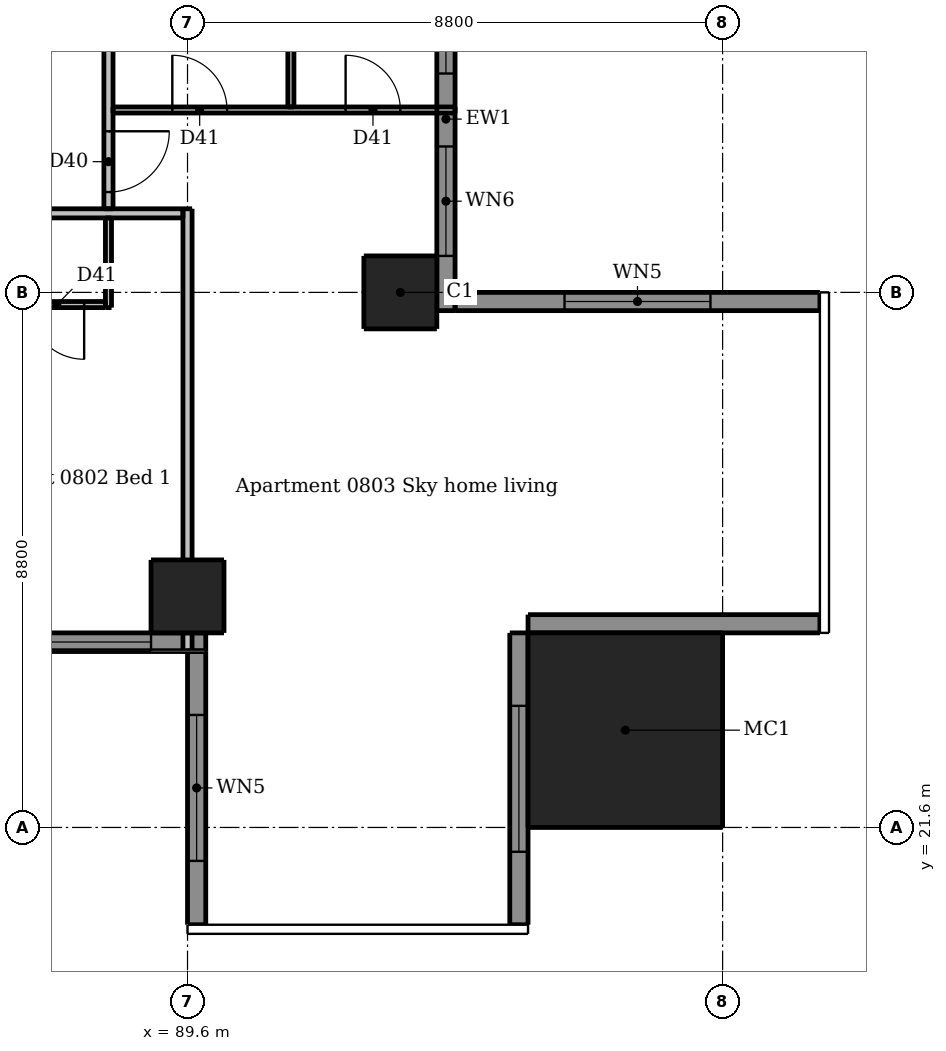
"""IFC4 building model, lengths in metres.
Left out: names, types, materials, properties, quantities, classifications, styles, units other than length and angle.
Written with IfcOpenShell. Run it as: python <this file> out.ifc"""

import sys

from ifc_helpers import new_model, si_unit, direction, frame, frame_2d, origin, origin_2d, place, context, subcontext, project, spatial, rectangle, extrude, element, fill, save


model = new_model("IFC4")
c1 = context("Model", 3, precision=1e-05, world=origin(), true_north=direction((0.0, 1.0)))
c2 = subcontext(c1, "Body", "Model", "MODEL_VIEW")
j1 = project(units=[si_unit("LENGTHUNIT", "METRE"), si_unit("PLANEANGLEUNIT", "RADIAN")], contexts=[c1])
p1 = place(None, origin())
s1 = spatial("IfcSite", under=j1, at=p1, CompositionType="ELEMENT")
p2 = place(p1, origin())
s2 = spatial("IfcBuilding", under=s1, at=p2, CompositionType="ELEMENT")
p3 = place(p2, frame((0.0, 0.0, 33.4)))
s3 = spatial("IfcBuildingStorey", under=s2, at=p3, CompositionType="ELEMENT", Elevation=33.4)
for number, where, z_axis, x_axis in (
    (1, (89.6, 25.4, 0.0), (0.0, 0.0, 1.0), (1.0, 0.0, 0.0)),
    (2, (93.1, 30.4, 0.0), (0.0, 0.0, 1.0), (1.0, 0.0, 0.0)),
):
    element("IfcColumn", number, at=place(p3, frame(where, z_axis=z_axis, x_axis=x_axis)), inside=s3, PredefinedType="COLUMN", context=c2, shape_type="SweptSolid", body=[
        extrude(rectangle(XDim=1.2, YDim=1.2, at=origin_2d()), origin(), (0.0, 0.0, 1.0), 3.05),
    ])
p4 = place(p3, frame((96.8, 23.2, 0.0), z_axis=(0.0, 0.0, 1.0), x_axis=(1.0, 0.0, 0.0)))
e3 = element("IfcColumn", 3, at=p4, inside=s3, PredefinedType="COLUMN", context=c2, shape_type="SweptSolid", body=[
    extrude(rectangle(XDim=3.2, YDim=3.2, at=origin_2d()), origin(), (0.0, 0.0, 1.0), 3.3),
])
p5 = place(p3, frame((89.75, 24.5, 0.0), z_axis=(0.0, 0.0, 1.0), x_axis=(0.0, -1.0, 0.0)))
e4 = element("IfcWall", 4, at=p5, inside=s3, PredefinedType="SOLIDWALL", context=c2, shape_type="SweptSolid", body=[
    extrude(rectangle(XDim=4.5, YDim=0.3, at=frame_2d((2.25, 0.0))), origin(), (0.0, 0.0, 1.0), 3.05),
])
p6 = place(p5, frame((1.05, 0.0, 0.15)))
e5 = element("IfcOpeningElement", 5, at=p6, cuts=e4, PredefinedType="OPENING", context=c2, shape_type="SweptSolid", body=[
    extrude(rectangle(XDim=2.4, YDim=2.1, at=frame_2d((1.2, 1.05))), frame((0.0, 0.16, 0.0), z_axis=(0.0, -1.0, 0.0), x_axis=(1.0, 0.0, 0.0)), (0.0, 0.0, 1.0), 0.32),
])
p7 = place(p3, frame((95.05, 20.0, 0.0), z_axis=(0.0, 0.0, 1.0), x_axis=(0.0, 1.0, 0.0)))
e6 = element("IfcWall", 6, at=p7, inside=s3, PredefinedType="SOLIDWALL", context=c2, shape_type="SweptSolid", body=[
    extrude(rectangle(XDim=4.8, YDim=0.3, at=frame_2d((2.4, 0.0))), origin(), (0.0, 0.0, 1.0), 3.05),
])
p8 = place(p7, frame((1.2, 0.0, 0.15)))
e7 = element("IfcOpeningElement", 7, at=p8, cuts=e6, PredefinedType="OPENING", context=c2, shape_type="SweptSolid", body=[
    extrude(rectangle(XDim=2.4, YDim=2.1, at=frame_2d((1.2, 1.05))), frame((0.0, 0.16, 0.0), z_axis=(0.0, -1.0, 0.0), x_axis=(1.0, 0.0, 0.0)), (0.0, 0.0, 1.0), 0.32),
])
p9 = place(p3, frame((95.2, 24.95, 0.0), z_axis=(0.0, 0.0, 1.0), x_axis=(1.0, 0.0, 0.0)))
e8 = element("IfcWall", 8, at=p9, inside=s3, PredefinedType="SOLIDWALL", context=c2, shape_type="SweptSolid", body=[
    extrude(rectangle(XDim=4.8, YDim=0.3, at=frame_2d((2.4, 0.0))), origin(), (0.0, 0.0, 1.0), 3.05),
])
p10 = place(p3, frame((100.0, 30.25, 0.0), z_axis=(0.0, 0.0, 1.0), x_axis=(-1.0, 0.0, 0.0)))
e9 = element("IfcWall", 9, at=p10, inside=s3, PredefinedType="SOLIDWALL", context=c2, shape_type="SweptSolid", body=[
    extrude(rectangle(XDim=6.0, YDim=0.3, at=frame_2d((3.0, 0.0))), origin(), (0.0, 0.0, 1.0), 3.05),
])
p11 = place(p10, frame((1.8, 0.0, 0.15)))
e10 = element("IfcOpeningElement", 10, at=p11, cuts=e9, PredefinedType="OPENING", context=c2, shape_type="SweptSolid", body=[
    extrude(rectangle(XDim=2.4, YDim=2.1, at=frame_2d((1.2, 1.05))), frame((0.0, 0.16, 0.0), z_axis=(0.0, -1.0, 0.0), x_axis=(1.0, 0.0, 0.0)), (0.0, 0.0, 1.0), 0.32),
])
p12 = place(p3, frame((83.6, 24.65, 0.0), z_axis=(0.0, 0.0, 1.0), x_axis=(1.0, 0.0, 0.0)))
e11 = element("IfcWall", 11, at=p12, inside=s3, PredefinedType="SOLIDWALL", context=c2, shape_type="SweptSolid", body=[
    extrude(rectangle(XDim=6.3, YDim=0.3, at=frame_2d((3.15, 0.0))), origin(), (0.0, 0.0, 1.0), 3.05),
])
p13 = place(p12, frame((0.6, 0.0, 0.15)))
e12 = element("IfcOpeningElement", 12, at=p13, cuts=e11, PredefinedType="OPENING", context=c2, shape_type="SweptSolid", body=[
    extrude(rectangle(XDim=1.8, YDim=2.1, at=frame_2d((0.9, 1.05))), frame((0.0, 0.16, 0.0), z_axis=(0.0, -1.0, 0.0), x_axis=(1.0, 0.0, 0.0)), (0.0, 0.0, 1.0), 0.32),
])
p14 = place(p12, frame((3.6, 0.0, 0.15)))
e13 = element("IfcOpeningElement", 13, at=p14, cuts=e11, PredefinedType="OPENING", context=c2, shape_type="SweptSolid", body=[
    extrude(rectangle(XDim=1.8, YDim=2.1, at=frame_2d((0.9, 1.05))), frame((0.0, 0.16, 0.0), z_axis=(0.0, -1.0, 0.0), x_axis=(1.0, 0.0, 0.0)), (0.0, 0.0, 1.0), 0.32),
])
p15 = place(p3, frame((93.85, 30.1, 0.0), z_axis=(0.0, 0.0, 1.0), x_axis=(0.0, 1.0, 0.0)))
e14 = element("IfcWall", 14, at=p15, inside=s3, PredefinedType="SOLIDWALL", context=c2, shape_type="SweptSolid", body=[
    extrude(rectangle(XDim=6.3, YDim=0.3, at=frame_2d((3.15, 0.0))), origin(), (0.0, 0.0, 1.0), 3.05),
])
p16 = place(p15, frame((0.9, 0.0, 0.15)))
e15 = element("IfcOpeningElement", 15, at=p16, cuts=e14, PredefinedType="OPENING", context=c2, shape_type="SweptSolid", body=[
    extrude(rectangle(XDim=1.8, YDim=2.1, at=frame_2d((0.9, 1.05))), frame((0.0, 0.16, 0.0), z_axis=(0.0, -1.0, 0.0), x_axis=(1.0, 0.0, 0.0)), (0.0, 0.0, 1.0), 0.32),
])
p17 = place(p15, frame((3.9, 0.0, 0.15)))
e16 = element("IfcOpeningElement", 16, at=p17, cuts=e14, PredefinedType="OPENING", context=c2, shape_type="SweptSolid", body=[
    extrude(rectangle(XDim=1.8, YDim=2.1, at=frame_2d((0.9, 1.05))), frame((0.0, 0.16, 0.0), z_axis=(0.0, -1.0, 0.0), x_axis=(1.0, 0.0, 0.0)), (0.0, 0.0, 1.0), 0.32),
])
p18 = place(p3, frame((88.3, 30.15, 0.0), z_axis=(0.0, 0.0, 1.0), x_axis=(0.0, 1.0, 0.0)))
e17 = element("IfcWall", 17, at=p18, inside=s3, PredefinedType="PARTITIONING", context=c2, shape_type="SweptSolid", body=[
    extrude(rectangle(XDim=1.475, YDim=0.1, at=frame_2d((0.738, 0.0))), origin(), (0.0, 0.0, 1.0), 3.05),
])
p19 = place(p3, frame((91.3, 33.45, 0.0), z_axis=(0.0, 0.0, 1.0), x_axis=(0.0, 1.0, 0.0)))
e18 = element("IfcWall", 18, at=p19, inside=s3, PredefinedType="PARTITIONING", context=c2, shape_type="SweptSolid", body=[
    extrude(rectangle(XDim=5.875, YDim=0.1, at=frame_2d((2.938, 0.0))), origin(), (0.0, 0.0, 1.0), 3.05),
])
p20 = place(p19, frame((3.75, 0.0, 0.0)))
e19 = element("IfcOpeningElement", 19, at=p20, cuts=e18, PredefinedType="OPENING", context=c2, shape_type="SweptSolid", body=[
    extrude(rectangle(XDim=0.8, YDim=2.1, at=frame_2d((0.4, 1.05))), frame((0.0, 0.06, 0.0), z_axis=(0.0, -1.0, 0.0), x_axis=(1.0, 0.0, 0.0)), (0.0, 0.0, 1.0), 0.12),
])
p21 = place(p3, frame((88.375, 33.4, 0.0), z_axis=(0.0, 0.0, 1.0), x_axis=(1.0, 0.0, 0.0)))
e20 = element("IfcWall", 20, at=p21, inside=s3, PredefinedType="PARTITIONING", context=c2, shape_type="SweptSolid", body=[
    extrude(rectangle(XDim=5.625, YDim=0.1, at=frame_2d((2.812, 0.0))), origin(), (0.0, 0.0, 1.0), 3.05),
])
p22 = place(p21, frame((0.975, 0.0, 0.0)))
e21 = element("IfcOpeningElement", 21, at=p22, cuts=e20, PredefinedType="OPENING", context=c2, shape_type="SweptSolid", body=[
    extrude(rectangle(XDim=0.9, YDim=2.1, at=frame_2d((0.45, 1.05))), frame((0.0, 0.06, 0.0), z_axis=(0.0, -1.0, 0.0), x_axis=(1.0, 0.0, 0.0)), (0.0, 0.0, 1.0), 0.12),
])
p23 = place(p21, frame((3.825, 0.0, 0.0)))
e22 = element("IfcOpeningElement", 22, at=p23, cuts=e20, PredefinedType="OPENING", context=c2, shape_type="SweptSolid", body=[
    extrude(rectangle(XDim=0.9, YDim=2.1, at=frame_2d((0.45, 1.05))), frame((0.0, 0.06, 0.0), z_axis=(0.0, -1.0, 0.0), x_axis=(1.0, 0.0, 0.0)), (0.0, 0.0, 1.0), 0.12),
])
p24 = place(p3, frame((88.25, 30.2, 0.0), z_axis=(0.0, 0.0, 1.0), x_axis=(-1.0, 0.0, 0.0)))
e23 = element("IfcWall", 23, at=p24, inside=s3, PredefinedType="PARTITIONING", context=c2, shape_type="SweptSolid", body=[
    extrude(rectangle(XDim=13.575, YDim=0.1, at=frame_2d((6.788, 0.0))), origin(), (0.0, 0.0, 1.0), 3.05),
])
p25 = place(p24, frame((7.5, 0.0, 0.0)))
e24 = element("IfcOpeningElement", 24, at=p25, cuts=e23, PredefinedType="OPENING", context=c2, shape_type="SweptSolid", body=[
    extrude(rectangle(XDim=0.9, YDim=2.1, at=frame_2d((0.45, 1.05))), frame((0.0, 0.06, 0.0), z_axis=(0.0, -1.0, 0.0), x_axis=(1.0, 0.0, 0.0)), (0.0, 0.0, 1.0), 0.12),
])
p26 = place(p24, frame((2.7, 0.0, 0.0)))
e25 = element("IfcOpeningElement", 25, at=p26, cuts=e23, PredefinedType="OPENING", context=c2, shape_type="SweptSolid", body=[
    extrude(rectangle(XDim=0.9, YDim=2.1, at=frame_2d((0.45, 1.05))), frame((0.0, 0.06, 0.0), z_axis=(0.0, -1.0, 0.0), x_axis=(1.0, 0.0, 0.0)), (0.0, 0.0, 1.0), 0.12),
])
p27 = place(p24, frame((0.35, 0.0, 0.0)))
e26 = element("IfcOpeningElement", 26, at=p27, cuts=e23, PredefinedType="OPENING", context=c2, shape_type="SweptSolid", body=[
    extrude(rectangle(XDim=0.9, YDim=2.1, at=frame_2d((0.45, 1.05))), frame((0.0, 0.06, 0.0), z_axis=(0.0, -1.0, 0.0), x_axis=(1.0, 0.0, 0.0)), (0.0, 0.0, 1.0), 0.12),
])
p28 = place(p24, frame((12.05, 0.0, 0.0)))
e27 = element("IfcOpeningElement", 27, at=p28, cuts=e23, PredefinedType="OPENING", context=c2, shape_type="SweptSolid", body=[
    extrude(rectangle(XDim=0.8, YDim=2.1, at=frame_2d((0.4, 1.05))), frame((0.0, 0.06, 0.0), z_axis=(0.0, -1.0, 0.0), x_axis=(1.0, 0.0, 0.0)), (0.0, 0.0, 1.0), 0.12),
])
p29 = place(p3, frame((88.3, 60.475, 0.0), z_axis=(0.0, 0.0, 1.0), x_axis=(0.0, -1.0, 0.0)))
e28 = element("IfcWall", 28, at=p29, inside=s3, PredefinedType="PARTITIONING", context=c2, shape_type="SweptSolid", body=[
    extrude(rectangle(XDim=28.7, YDim=0.15, at=frame_2d((14.35, 0.0))), origin(), (0.0, 0.0, 1.0), 3.05),
])
p30 = place(p29, frame((27.425, 0.0, 0.0)))
e29 = element("IfcOpeningElement", 29, at=p30, cuts=e28, PredefinedType="OPENING", context=c2, shape_type="SweptSolid", body=[
    extrude(rectangle(XDim=1.0, YDim=2.1, at=frame_2d((0.5, 1.05))), frame((0.0, 0.085, 0.0), z_axis=(0.0, -1.0, 0.0), x_axis=(1.0, 0.0, 0.0)), (0.0, 0.0, 1.0), 0.17),
])
p31 = place(p29, frame((10.625, 0.0, 0.0)))
e30 = element("IfcOpeningElement", 30, at=p31, cuts=e28, PredefinedType="OPENING", context=c2, shape_type="SweptSolid", body=[
    extrude(rectangle(XDim=1.0, YDim=2.1, at=frame_2d((0.5, 1.05))), frame((0.0, 0.085, 0.0), z_axis=(0.0, -1.0, 0.0), x_axis=(1.0, 0.0, 0.0)), (0.0, 0.0, 1.0), 0.17),
])
p32 = place(p3, frame((89.6, 24.5, 0.0), z_axis=(0.0, 0.0, 1.0), x_axis=(0.0, 1.0, 0.0)))
e31 = element("IfcWall", 31, at=p32, inside=s3, PredefinedType="PARTITIONING", context=c2, shape_type="SweptSolid", body=[
    extrude(rectangle(XDim=7.275, YDim=0.15, at=frame_2d((3.637, 0.0))), origin(), (0.0, 0.0, 1.0), 2.516),
])
p33 = place(p3, frame((89.525, 31.7, 0.0), z_axis=(0.0, 0.0, 1.0), x_axis=(-1.0, 0.0, 0.0)))
e32 = element("IfcWall", 32, at=p33, inside=s3, PredefinedType="PARTITIONING", context=c2, shape_type="SweptSolid", body=[
    extrude(rectangle(XDim=28.75, YDim=0.15, at=frame_2d((14.375, 0.0))), origin(), (0.0, 0.0, 1.0), 3.05),
])
p34 = place(p33, frame((24.475, 0.0, 0.0)))
e33 = element("IfcOpeningElement", 33, at=p34, cuts=e32, PredefinedType="OPENING", context=c2, shape_type="SweptSolid", body=[
    extrude(rectangle(XDim=1.0, YDim=2.1, at=frame_2d((0.5, 1.05))), frame((0.0, 0.085, 0.0), z_axis=(0.0, -1.0, 0.0), x_axis=(1.0, 0.0, 0.0)), (0.0, 0.0, 1.0), 0.17),
])
p35 = place(p33, frame((7.575, 0.0, 0.0)))
e34 = element("IfcOpeningElement", 34, at=p35, cuts=e32, PredefinedType="OPENING", context=c2, shape_type="SweptSolid", body=[
    extrude(rectangle(XDim=1.0, YDim=2.1, at=frame_2d((0.5, 1.05))), frame((0.0, 0.085, 0.0), z_axis=(0.0, -1.0, 0.0), x_axis=(1.0, 0.0, 0.0)), (0.0, 0.0, 1.0), 0.17),
])
p36 = place(p6, origin())
e35 = element("IfcWindow", 35, at=p36, inside=s3, PartitioningType="DOUBLE_PANEL_VERTICAL", PredefinedType="WINDOW", context=c2, shape_type="SweptSolid", body=[
    extrude(rectangle(XDim=2.4, YDim=2.1, at=frame_2d((1.2, 1.05))), frame((0.0, 0.03, 0.0), z_axis=(0.0, -1.0, 0.0), x_axis=(1.0, 0.0, 0.0)), (0.0, 0.0, 1.0), 0.06),
])
fill(e5, e35)
p37 = place(p8, origin())
e36 = element("IfcWindow", 36, at=p37, inside=s3, PartitioningType="DOUBLE_PANEL_VERTICAL", PredefinedType="WINDOW", context=c2, shape_type="SweptSolid", body=[
    extrude(rectangle(XDim=2.4, YDim=2.1, at=frame_2d((1.2, 1.05))), frame((0.0, 0.03, 0.0), z_axis=(0.0, -1.0, 0.0), x_axis=(1.0, 0.0, 0.0)), (0.0, 0.0, 1.0), 0.06),
])
fill(e7, e36)
p38 = place(p11, origin())
e37 = element("IfcWindow", 37, at=p38, inside=s3, PartitioningType="DOUBLE_PANEL_VERTICAL", PredefinedType="WINDOW", context=c2, shape_type="SweptSolid", body=[
    extrude(rectangle(XDim=2.4, YDim=2.1, at=frame_2d((1.2, 1.05))), frame((0.0, 0.03, 0.0), z_axis=(0.0, -1.0, 0.0), x_axis=(1.0, 0.0, 0.0)), (0.0, 0.0, 1.0), 0.06),
])
fill(e10, e37)
p39 = place(p14, origin())
e38 = element("IfcWindow", 38, at=p39, inside=s3, PartitioningType="DOUBLE_PANEL_VERTICAL", PredefinedType="WINDOW", context=c2, shape_type="SweptSolid", body=[
    extrude(rectangle(XDim=1.8, YDim=2.1, at=frame_2d((0.9, 1.05))), frame((0.0, 0.03, 0.0), z_axis=(0.0, -1.0, 0.0), x_axis=(1.0, 0.0, 0.0)), (0.0, 0.0, 1.0), 0.06),
])
fill(e13, e38)
p40 = place(p16, origin())
e39 = element("IfcWindow", 39, at=p40, inside=s3, PartitioningType="DOUBLE_PANEL_VERTICAL", PredefinedType="WINDOW", context=c2, shape_type="SweptSolid", body=[
    extrude(rectangle(XDim=1.8, YDim=2.1, at=frame_2d((0.9, 1.05))), frame((0.0, 0.03, 0.0), z_axis=(0.0, -1.0, 0.0), x_axis=(1.0, 0.0, 0.0)), (0.0, 0.0, 1.0), 0.06),
])
fill(e15, e39)
p41 = place(p17, origin())
e40 = element("IfcWindow", 40, at=p41, inside=s3, PartitioningType="DOUBLE_PANEL_VERTICAL", PredefinedType="WINDOW", context=c2, shape_type="SweptSolid", body=[
    extrude(rectangle(XDim=1.8, YDim=2.1, at=frame_2d((0.9, 1.05))), frame((0.0, 0.03, 0.0), z_axis=(0.0, -1.0, 0.0), x_axis=(1.0, 0.0, 0.0)), (0.0, 0.0, 1.0), 0.06),
])
fill(e16, e40)
p42 = place(p27, origin())
e41 = element("IfcDoor", 41, at=p42, inside=s3, OperationType="SINGLE_SWING_LEFT", PredefinedType="DOOR", context=c2, shape_type="SweptSolid", body=[
    extrude(rectangle(XDim=0.9, YDim=2.1, at=frame_2d((0.45, 1.05))), frame((0.0, 0.025, 0.0), z_axis=(0.0, -1.0, 0.0), x_axis=(1.0, 0.0, 0.0)), (0.0, 0.0, 1.0), 0.05),
])
fill(e26, e41)
p43 = place(p30, origin())
e42 = element("IfcDoor", 42, at=p43, inside=s3, OperationType="SINGLE_SWING_LEFT", PredefinedType="DOOR", context=c2, shape_type="SweptSolid", body=[
    extrude(rectangle(XDim=1.0, YDim=2.1, at=frame_2d((0.5, 1.05))), frame((0.0, 0.025, 0.0), z_axis=(0.0, -1.0, 0.0), x_axis=(1.0, 0.0, 0.0)), (0.0, 0.0, 1.0), 0.05),
])
fill(e29, e42)
p44 = place(p22, origin())
e43 = element("IfcDoor", 43, at=p44, inside=s3, OperationType="SINGLE_SWING_LEFT", PredefinedType="DOOR", context=c2, shape_type="SweptSolid", body=[
    extrude(rectangle(XDim=0.9, YDim=2.1, at=frame_2d((0.45, 1.05))), frame((0.0, 0.025, 0.0), z_axis=(0.0, -1.0, 0.0), x_axis=(1.0, 0.0, 0.0)), (0.0, 0.0, 1.0), 0.05),
])
fill(e21, e43)
p45 = place(p23, origin())
e44 = element("IfcDoor", 44, at=p45, inside=s3, OperationType="SINGLE_SWING_LEFT", PredefinedType="DOOR", context=c2, shape_type="SweptSolid", body=[
    extrude(rectangle(XDim=0.9, YDim=2.1, at=frame_2d((0.45, 1.05))), frame((0.0, 0.025, 0.0), z_axis=(0.0, -1.0, 0.0), x_axis=(1.0, 0.0, 0.0)), (0.0, 0.0, 1.0), 0.05),
])
fill(e22, e44)
save(model, sys.argv[1])
